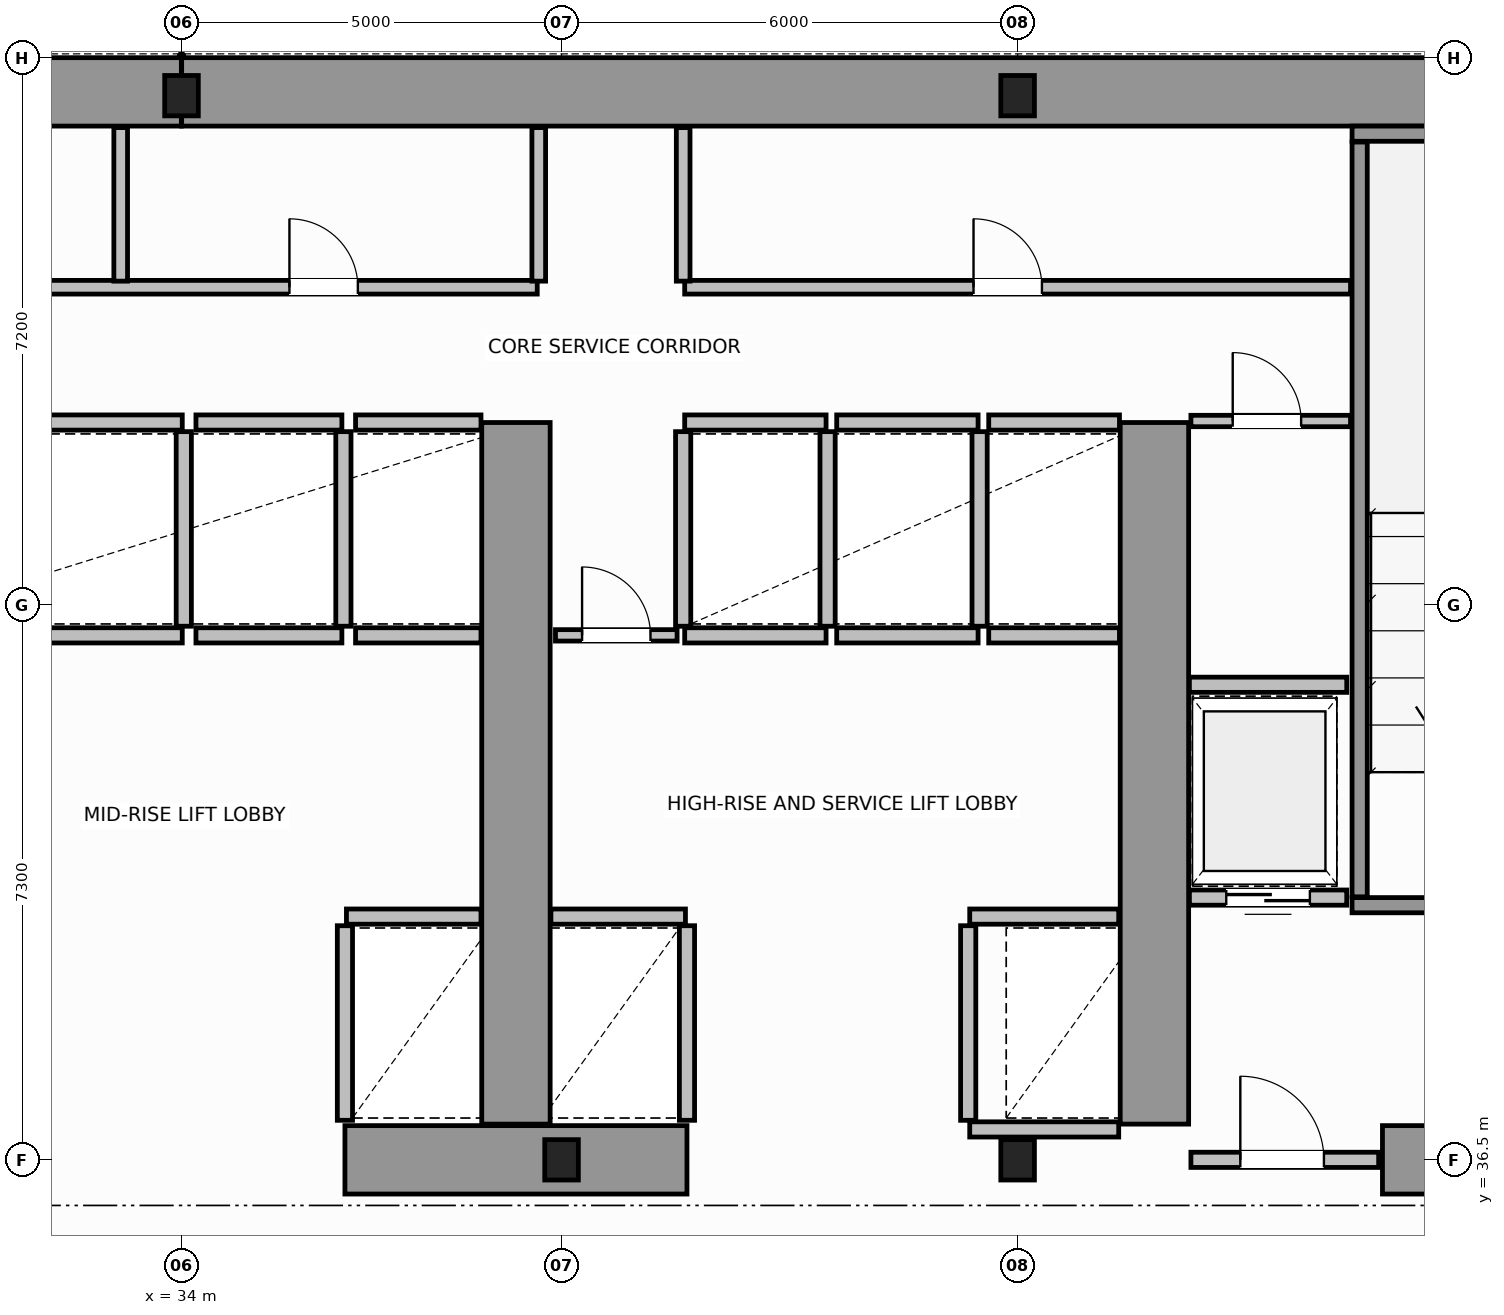
"""IFC4 building model, lengths in metres.
Left out: names, types, materials, properties, quantities, classifications, styles, units other than length and angle.
Written with IfcOpenShell. Run it as: python <this file> out.ifc"""

import sys

from ifc_helpers import new_model, si_unit, direction, frame, frame_2d, origin, origin_2d, place, context, subcontext, project, spatial, rectangle, i_section, extrude, source, transform, mapped, element, fill, save


model = new_model("IFC4")
c1 = context("Model", 3, precision=1e-05, world=origin(), true_north=direction((0.0, 1.0)))
c2 = subcontext(c1, "Body", "Model", "MODEL_VIEW")
j1 = project(units=[si_unit("LENGTHUNIT", "METRE"), si_unit("PLANEANGLEUNIT", "RADIAN")], contexts=[c1])
p1 = place(None, origin())
s1 = spatial("IfcSite", under=j1, at=p1, CompositionType="ELEMENT")
p2 = place(p1, origin())
s2 = spatial("IfcBuilding", under=s1, at=p2, CompositionType="ELEMENT")
p3 = place(p2, frame((0.0, 0.0, 72.0)))
s3 = spatial("IfcBuildingStorey", under=s2, at=p3, CompositionType="ELEMENT", Elevation=72.0)
m1 = source(origin(), c2, "Body", "SweptSolid", [
    extrude(i_section(OverallWidth=0.442, OverallDepth=0.531, WebThickness=0.065, FlangeThickness=0.076, FilletRadius=0.015, at=origin_2d()), origin(), (0.0, 0.0, 1.0), 3.8),
])
for number, where, z_axis, x_axis in (
    (1, (39.0, 36.5, 0.0), (0.0, 0.0, 1.0), (1.0, 0.0, 0.0)),
    (2, (45.0, 36.5, 0.0), (0.0, 0.0, 1.0), (1.0, 0.0, 0.0)),
    (3, (34.0, 50.5, 0.0), (0.0, 0.0, 1.0), (1.0, 0.0, 0.0)),
    (4, (45.0, 50.5, 0.0), (0.0, 0.0, 1.0), (1.0, 0.0, 0.0)),
):
    element("IfcColumn", number, at=place(p3, frame(where, z_axis=z_axis, x_axis=x_axis)), inside=s3, PredefinedType="COLUMN", context=c2, shape_type="MappedRepresentation", body=[
        mapped(m1, transform((0.0, 0.0, 0.0), scale=1.0)),
    ])
for number, where, z_axis, x_axis in (
    (5, (14.454, 50.55, 0.0), (0.0, 0.0, 1.0), (1.0, 0.0, 0.0)),
    (6, (34.002, 50.55, 0.0), (0.0, 0.0, 1.0), (1.0, 0.0, 0.0)),
):
    element("IfcWall", number, at=place(p3, frame(where, z_axis=z_axis, x_axis=x_axis)), inside=s3, PredefinedType="SHEAR", context=c2, shape_type="SweptSolid", body=[
        extrude(rectangle(XDim=19.544, YDim=0.9, at=frame_2d((9.772, 0.0))), origin(), (0.0, 0.0, 1.0), 3.8),
    ])
p4 = place(p3, frame((36.15, 36.5, 0.0), z_axis=(0.0, 0.0, 1.0), x_axis=(1.0, 0.0, 0.0)))
e7 = element("IfcWall", 7, at=p4, inside=s3, PredefinedType="SHEAR", context=c2, shape_type="SweptSolid", body=[
    extrude(rectangle(XDim=4.5, YDim=0.9, at=frame_2d((2.25, 0.0))), origin(), (0.0, 0.0, 1.0), 3.8),
])
p5 = place(p3, frame((49.8, 36.5, 0.0), z_axis=(0.0, 0.0, 1.0), x_axis=(1.0, 0.0, 0.0)))
e8 = element("IfcWall", 8, at=p5, inside=s3, PredefinedType="SHEAR", context=c2, shape_type="SweptSolid", body=[
    extrude(rectangle(XDim=3.73, YDim=0.9, at=frame_2d((1.865, 0.0))), origin(), (0.0, 0.0, 1.0), 2.38),
])
for number, where, z_axis, x_axis in (
    (9, (38.4, 36.97, 0.0), (0.0, 0.0, 1.0), (0.0, 1.0, 0.0)),
    (10, (46.8, 36.97, 0.0), (0.0, 0.0, 1.0), (0.0, 1.0, 0.0)),
):
    element("IfcWall", number, at=place(p3, frame(where, z_axis=z_axis, x_axis=x_axis)), inside=s3, PredefinedType="SHEAR", context=c2, shape_type="SweptSolid", body=[
        extrude(rectangle(XDim=9.23, YDim=0.9, at=frame_2d((4.615, 0.0))), origin(), (0.0, 0.0, 1.0), 3.8),
    ])
p6 = place(p3, frame((49.4, 39.85, 0.0), z_axis=(0.0, 0.0, 1.0), x_axis=(1.0, 0.0, 0.0)))
e11 = element("IfcWall", 11, at=p6, inside=s3, PredefinedType="SOLIDWALL", context=c2, shape_type="SweptSolid", body=[
    extrude(rectangle(XDim=4.15, YDim=0.2, at=frame_2d((2.075, 0.0))), origin(), (0.0, 0.0, 1.0), 3.8),
])
p7 = place(p6, frame((1.325, 0.0, 0.0)))
e12 = element("IfcOpeningElement", 12, at=p7, cuts=e11, PredefinedType="OPENING", context=c2, shape_type="SweptSolid", body=[
    extrude(rectangle(XDim=1.1, YDim=2.15, at=frame_2d((0.55, 1.075))), frame((0.0, 0.11, 0.0), z_axis=(0.0, -1.0, 0.0), x_axis=(1.0, 0.0, 0.0)), (0.0, 0.0, 1.0), 0.22),
])
p8 = place(p3, frame((49.4, 50.0, 0.0), z_axis=(0.0, 0.0, 1.0), x_axis=(1.0, 0.0, 0.0)))
e13 = element("IfcWall", 13, at=p8, inside=s3, PredefinedType="SOLIDWALL", context=c2, shape_type="SweptSolid", body=[
    extrude(rectangle(XDim=4.15, YDim=0.2, at=frame_2d((2.075, 0.0))), origin(), (0.0, 0.0, 1.0), 3.8),
])
p9 = place(p3, frame((49.5, 39.96, 0.0), z_axis=(0.0, 0.0, 1.0), x_axis=(0.0, 1.0, 0.0)))
e14 = element("IfcWall", 14, at=p9, inside=s3, PredefinedType="SOLIDWALL", context=c2, shape_type="SweptSolid", body=[
    extrude(rectangle(XDim=9.93, YDim=0.2, at=frame_2d((4.965, 0.0))), origin(), (0.0, 0.0, 1.0), 3.8),
])
p10 = place(p3, frame((47.28, 36.5, 0.0), z_axis=(0.0, 0.0, 1.0), x_axis=(1.0, 0.0, 0.0)))
e15 = element("IfcWall", 15, at=p10, inside=s3, PredefinedType="SOLIDWALL", context=c2, shape_type="SweptSolid", body=[
    extrude(rectangle(XDim=2.47, YDim=0.2, at=frame_2d((1.235, 0.0))), origin(), (0.0, 0.0, 1.0), 2.37),
])
p11 = place(p10, frame((0.65, 0.0, 0.0)))
e16 = element("IfcOpeningElement", 16, at=p11, cuts=e15, PredefinedType="OPENING", context=c2, shape_type="SweptSolid", body=[
    extrude(rectangle(XDim=1.1, YDim=2.15, at=frame_2d((0.55, 1.075))), frame((0.0, 0.11, 0.0), z_axis=(0.0, -1.0, 0.0), x_axis=(1.0, 0.0, 0.0)), (0.0, 0.0, 1.0), 0.22),
])
p12 = place(p3, frame((36.17, 39.7, 0.0), z_axis=(0.0, 0.0, 1.0), x_axis=(1.0, 0.0, 0.0)))
e17 = element("IfcWall", 17, at=p12, inside=s3, PredefinedType="SOLIDWALL", context=c2, shape_type="SweptSolid", body=[
    extrude(rectangle(XDim=1.77, YDim=0.2, at=frame_2d((0.885, 0.0))), origin(), (0.0, 0.0, 1.0), 3.58),
])
p13 = place(p3, frame((36.15, 37.02, 0.0), z_axis=(0.0, 0.0, 1.0), x_axis=(0.0, 1.0, 0.0)))
e18 = element("IfcWall", 18, at=p13, inside=s3, PredefinedType="SOLIDWALL", context=c2, shape_type="SweptSolid", body=[
    extrude(rectangle(XDim=2.56, YDim=0.2, at=frame_2d((1.28, 0.0))), origin(), (0.0, 0.0, 1.0), 3.58),
])
for number, where, z_axis, x_axis in (
    (19, (32.09, 43.4, 0.0), (0.0, 0.0, 1.0), (1.0, 0.0, 0.0)),
    (20, (32.09, 46.2, 0.0), (0.0, 0.0, 1.0), (1.0, 0.0, 0.0)),
):
    element("IfcWall", number, at=place(p3, frame(where, z_axis=z_axis, x_axis=x_axis)), inside=s3, PredefinedType="SOLIDWALL", context=c2, shape_type="SweptSolid", body=[
        extrude(rectangle(XDim=1.92, YDim=0.2, at=frame_2d((0.96, 0.0))), origin(), (0.0, 0.0, 1.0), 3.58),
    ])
p14 = place(p3, frame((34.03, 43.52, 0.0), z_axis=(0.0, 0.0, 1.0), x_axis=(0.0, 1.0, 0.0)))
e21 = element("IfcWall", 21, at=p14, inside=s3, PredefinedType="SOLIDWALL", context=c2, shape_type="SweptSolid", body=[
    extrude(rectangle(XDim=2.56, YDim=0.2, at=frame_2d((1.28, 0.0))), origin(), (0.0, 0.0, 1.0), 3.58),
])
for number, where, z_axis, x_axis in (
    (22, (34.19, 43.4, 0.0), (0.0, 0.0, 1.0), (1.0, 0.0, 0.0)),
    (23, (34.19, 46.2, 0.0), (0.0, 0.0, 1.0), (1.0, 0.0, 0.0)),
):
    element("IfcWall", number, at=place(p3, frame(where, z_axis=z_axis, x_axis=x_axis)), inside=s3, PredefinedType="SOLIDWALL", context=c2, shape_type="SweptSolid", body=[
        extrude(rectangle(XDim=1.92, YDim=0.2, at=frame_2d((0.96, 0.0))), origin(), (0.0, 0.0, 1.0), 3.58),
    ])
p15 = place(p3, frame((36.13, 43.52, 0.0), z_axis=(0.0, 0.0, 1.0), x_axis=(0.0, 1.0, 0.0)))
e24 = element("IfcWall", 24, at=p15, inside=s3, PredefinedType="SOLIDWALL", context=c2, shape_type="SweptSolid", body=[
    extrude(rectangle(XDim=2.56, YDim=0.2, at=frame_2d((1.28, 0.0))), origin(), (0.0, 0.0, 1.0), 3.58),
])
for number, where, z_axis, x_axis in (
    (25, (36.29, 43.4, 0.0), (0.0, 0.0, 1.0), (1.0, 0.0, 0.0)),
    (26, (36.29, 46.2, 0.0), (0.0, 0.0, 1.0), (1.0, 0.0, 0.0)),
):
    element("IfcWall", number, at=place(p3, frame(where, z_axis=z_axis, x_axis=x_axis)), inside=s3, PredefinedType="SOLIDWALL", context=c2, shape_type="SweptSolid", body=[
        extrude(rectangle(XDim=1.65, YDim=0.2, at=frame_2d((0.825, 0.0))), origin(), (0.0, 0.0, 1.0), 3.58),
    ])
p16 = place(p3, frame((38.86, 39.7, 0.0), z_axis=(0.0, 0.0, 1.0), x_axis=(1.0, 0.0, 0.0)))
e27 = element("IfcWall", 27, at=p16, inside=s3, PredefinedType="SOLIDWALL", context=c2, shape_type="SweptSolid", body=[
    extrude(rectangle(XDim=1.77, YDim=0.2, at=frame_2d((0.885, 0.0))), origin(), (0.0, 0.0, 1.0), 3.58),
])
p17 = place(p3, frame((40.65, 37.02, 0.0), z_axis=(0.0, 0.0, 1.0), x_axis=(0.0, 1.0, 0.0)))
e28 = element("IfcWall", 28, at=p17, inside=s3, PredefinedType="SOLIDWALL", context=c2, shape_type="SweptSolid", body=[
    extrude(rectangle(XDim=2.56, YDim=0.2, at=frame_2d((1.28, 0.0))), origin(), (0.0, 0.0, 1.0), 3.58),
])
p18 = place(p3, frame((44.37, 39.7, 0.0), z_axis=(0.0, 0.0, 1.0), x_axis=(1.0, 0.0, 0.0)))
e29 = element("IfcWall", 29, at=p18, inside=s3, PredefinedType="SOLIDWALL", context=c2, shape_type="SweptSolid", body=[
    extrude(rectangle(XDim=1.96, YDim=0.2, at=frame_2d((0.98, 0.0))), origin(), (0.0, 0.0, 1.0), 3.58),
])
p19 = place(p3, frame((44.37, 36.9, 0.0), z_axis=(0.0, 0.0, 1.0), x_axis=(1.0, 0.0, 0.0)))
e30 = element("IfcWall", 30, at=p19, inside=s3, PredefinedType="SOLIDWALL", context=c2, shape_type="SweptSolid", body=[
    extrude(rectangle(XDim=1.96, YDim=0.2, at=frame_2d((0.98, 0.0))), origin(), (0.0, 0.0, 1.0), 2.37),
])
p20 = place(p3, frame((44.35, 37.02, 0.0), z_axis=(0.0, 0.0, 1.0), x_axis=(0.0, 1.0, 0.0)))
e31 = element("IfcWall", 31, at=p20, inside=s3, PredefinedType="SOLIDWALL", context=c2, shape_type="SweptSolid", body=[
    extrude(rectangle(XDim=2.56, YDim=0.2, at=frame_2d((1.28, 0.0))), origin(), (0.0, 0.0, 1.0), 3.58),
])
for number, where, z_axis, x_axis in (
    (32, (40.62, 43.4, 0.0), (0.0, 0.0, 1.0), (1.0, 0.0, 0.0)),
    (33, (40.62, 46.2, 0.0), (0.0, 0.0, 1.0), (1.0, 0.0, 0.0)),
):
    element("IfcWall", number, at=place(p3, frame(where, z_axis=z_axis, x_axis=x_axis)), inside=s3, PredefinedType="SOLIDWALL", context=c2, shape_type="SweptSolid", body=[
        extrude(rectangle(XDim=1.86, YDim=0.2, at=frame_2d((0.93, 0.0))), origin(), (0.0, 0.0, 1.0), 3.58),
    ])
for number, where, z_axis, x_axis in (
    (34, (40.6, 43.52, 0.0), (0.0, 0.0, 1.0), (0.0, 1.0, 0.0)),
    (35, (42.5, 43.52, 0.0), (0.0, 0.0, 1.0), (0.0, 1.0, 0.0)),
):
    element("IfcWall", number, at=place(p3, frame(where, z_axis=z_axis, x_axis=x_axis)), inside=s3, PredefinedType="SOLIDWALL", context=c2, shape_type="SweptSolid", body=[
        extrude(rectangle(XDim=2.56, YDim=0.2, at=frame_2d((1.28, 0.0))), origin(), (0.0, 0.0, 1.0), 3.58),
    ])
for number, where, z_axis, x_axis in (
    (36, (42.62, 43.4, 0.0), (0.0, 0.0, 1.0), (1.0, 0.0, 0.0)),
    (37, (42.62, 46.2, 0.0), (0.0, 0.0, 1.0), (1.0, 0.0, 0.0)),
):
    element("IfcWall", number, at=place(p3, frame(where, z_axis=z_axis, x_axis=x_axis)), inside=s3, PredefinedType="SOLIDWALL", context=c2, shape_type="SweptSolid", body=[
        extrude(rectangle(XDim=1.86, YDim=0.2, at=frame_2d((0.93, 0.0))), origin(), (0.0, 0.0, 1.0), 3.58),
    ])
p21 = place(p3, frame((44.5, 43.52, 0.0), z_axis=(0.0, 0.0, 1.0), x_axis=(0.0, 1.0, 0.0)))
e38 = element("IfcWall", 38, at=p21, inside=s3, PredefinedType="SOLIDWALL", context=c2, shape_type="SweptSolid", body=[
    extrude(rectangle(XDim=2.56, YDim=0.2, at=frame_2d((1.28, 0.0))), origin(), (0.0, 0.0, 1.0), 3.58),
])
for number, where, z_axis, x_axis in (
    (39, (44.62, 43.4, 0.0), (0.0, 0.0, 1.0), (1.0, 0.0, 0.0)),
    (40, (44.62, 46.2, 0.0), (0.0, 0.0, 1.0), (1.0, 0.0, 0.0)),
):
    element("IfcWall", number, at=place(p3, frame(where, z_axis=z_axis, x_axis=x_axis)), inside=s3, PredefinedType="SOLIDWALL", context=c2, shape_type="SweptSolid", body=[
        extrude(rectangle(XDim=1.72, YDim=0.2, at=frame_2d((0.86, 0.0))), origin(), (0.0, 0.0, 1.0), 3.58),
    ])
p22 = place(p3, frame((47.26, 39.95, 0.0), z_axis=(0.0, 0.0, 1.0), x_axis=(1.0, 0.0, 0.0)))
e41 = element("IfcWall", 41, at=p22, inside=s3, PredefinedType="SOLIDWALL", context=c2, shape_type="SweptSolid", body=[
    extrude(rectangle(XDim=2.07, YDim=0.2, at=frame_2d((1.035, 0.0))), origin(), (0.0, 0.0, 1.0), 3.58),
])
p23 = place(p22, frame((0.485, 0.0, 0.0)))
e42 = element("IfcOpeningElement", 42, at=p23, cuts=e41, PredefinedType="OPENING", context=c2, shape_type="SweptSolid", body=[
    extrude(rectangle(XDim=1.1, YDim=2.15, at=frame_2d((0.55, 1.075))), frame((0.0, 0.11, 0.0), z_axis=(0.0, -1.0, 0.0), x_axis=(1.0, 0.0, 0.0)), (0.0, 0.0, 1.0), 0.22),
])
p24 = place(p3, frame((47.26, 42.75, 0.0), z_axis=(0.0, 0.0, 1.0), x_axis=(1.0, 0.0, 0.0)))
e43 = element("IfcWall", 43, at=p24, inside=s3, PredefinedType="SOLIDWALL", context=c2, shape_type="SweptSolid", body=[
    extrude(rectangle(XDim=2.07, YDim=0.2, at=frame_2d((1.035, 0.0))), origin(), (0.0, 0.0, 1.0), 3.58),
])
p25 = place(p3, frame((47.28, 46.22, 0.0), z_axis=(0.0, 0.0, 1.0), x_axis=(1.0, 0.0, 0.0)))
e44 = element("IfcWall", 44, at=p25, inside=s3, PredefinedType="PARTITIONING", context=c2, shape_type="SweptSolid", body=[
    extrude(rectangle(XDim=2.1, YDim=0.15, at=frame_2d((1.05, 0.0))), origin(), (0.0, 0.0, 1.0), 3.58),
])
p26 = place(p25, frame((0.55, 0.0, 0.0)))
e45 = element("IfcOpeningElement", 45, at=p26, cuts=e44, PredefinedType="OPENING", context=c2, shape_type="SweptSolid", body=[
    extrude(rectangle(XDim=0.9, YDim=2.1, at=frame_2d((0.45, 1.05))), frame((0.0, 0.085, 0.0), z_axis=(0.0, -1.0, 0.0), x_axis=(1.0, 0.0, 0.0)), (0.0, 0.0, 1.0), 0.17),
])
p27 = place(p3, frame((38.92, 43.4, 0.0), z_axis=(0.0, 0.0, 1.0), x_axis=(1.0, 0.0, 0.0)))
e46 = element("IfcWall", 46, at=p27, inside=s3, PredefinedType="PARTITIONING", context=c2, shape_type="SweptSolid", body=[
    extrude(rectangle(XDim=1.6, YDim=0.15, at=frame_2d((0.8, 0.0))), origin(), (0.0, 0.0, 1.0), 3.58),
])
p28 = place(p27, frame((0.35, 0.0, 0.0)))
e47 = element("IfcOpeningElement", 47, at=p28, cuts=e46, PredefinedType="OPENING", context=c2, shape_type="SweptSolid", body=[
    extrude(rectangle(XDim=0.9, YDim=2.1, at=frame_2d((0.45, 1.05))), frame((0.0, 0.085, 0.0), z_axis=(0.0, -1.0, 0.0), x_axis=(1.0, 0.0, 0.0)), (0.0, 0.0, 1.0), 0.17),
])
p29 = place(p3, frame((18.62, 47.98, 0.0), z_axis=(0.0, 0.0, 1.0), x_axis=(1.0, 0.0, 0.0)))
e48 = element("IfcWall", 48, at=p29, inside=s3, PredefinedType="PLUMBINGWALL", context=c2, shape_type="SweptSolid", body=[
    extrude(rectangle(XDim=20.06, YDim=0.18, at=frame_2d((10.03, 0.0))), origin(), (0.0, 0.0, 1.0), 3.58),
])
p30 = place(p29, frame((3.5, 0.0, 0.0)))
e49 = element("IfcOpeningElement", 49, at=p30, cuts=e48, PredefinedType="OPENING", context=c2, shape_type="SweptSolid", body=[
    extrude(rectangle(XDim=0.9, YDim=2.15, at=frame_2d((0.45, 1.075))), frame((0.0, 0.1, 0.0), z_axis=(0.0, -1.0, 0.0), x_axis=(1.0, 0.0, 0.0)), (0.0, 0.0, 1.0), 0.2),
])
p31 = place(p29, frame((10.8, 0.0, 0.0)))
e50 = element("IfcOpeningElement", 50, at=p31, cuts=e48, PredefinedType="OPENING", context=c2, shape_type="SweptSolid", body=[
    extrude(rectangle(XDim=0.9, YDim=2.15, at=frame_2d((0.45, 1.075))), frame((0.0, 0.1, 0.0), z_axis=(0.0, -1.0, 0.0), x_axis=(1.0, 0.0, 0.0)), (0.0, 0.0, 1.0), 0.2),
])
p32 = place(p29, frame((16.8, 0.0, 0.0)))
e51 = element("IfcOpeningElement", 51, at=p32, cuts=e48, PredefinedType="OPENING", context=c2, shape_type="SweptSolid", body=[
    extrude(rectangle(XDim=0.9, YDim=2.15, at=frame_2d((0.45, 1.075))), frame((0.0, 0.1, 0.0), z_axis=(0.0, -1.0, 0.0), x_axis=(1.0, 0.0, 0.0)), (0.0, 0.0, 1.0), 0.2),
])
p33 = place(p3, frame((40.62, 47.98, 0.0), z_axis=(0.0, 0.0, 1.0), x_axis=(1.0, 0.0, 0.0)))
e52 = element("IfcWall", 52, at=p33, inside=s3, PredefinedType="PLUMBINGWALL", context=c2, shape_type="SweptSolid", body=[
    extrude(rectangle(XDim=8.76, YDim=0.18, at=frame_2d((4.38, 0.0))), origin(), (0.0, 0.0, 1.0), 3.58),
])
p34 = place(p33, frame((3.8, 0.0, 0.0)))
e53 = element("IfcOpeningElement", 53, at=p34, cuts=e52, PredefinedType="OPENING", context=c2, shape_type="SweptSolid", body=[
    extrude(rectangle(XDim=0.9, YDim=2.15, at=frame_2d((0.45, 1.075))), frame((0.0, 0.1, 0.0), z_axis=(0.0, -1.0, 0.0), x_axis=(1.0, 0.0, 0.0)), (0.0, 0.0, 1.0), 0.2),
])
for number, where, z_axis, x_axis in (
    (54, (33.2, 48.06, 0.0), (0.0, 0.0, 1.0), (0.0, 1.0, 0.0)),
    (55, (38.7, 48.06, 0.0), (0.0, 0.0, 1.0), (0.0, 1.0, 0.0)),
    (56, (40.6, 48.06, 0.0), (0.0, 0.0, 1.0), (0.0, 1.0, 0.0)),
):
    element("IfcWall", number, at=place(p3, frame(where, z_axis=z_axis, x_axis=x_axis)), inside=s3, PredefinedType="PLUMBINGWALL", context=c2, shape_type="SweptSolid", body=[
        extrude(rectangle(XDim=2.02, YDim=0.18, at=frame_2d((1.01, 0.0))), origin(), (0.0, 0.0, 1.0), 3.58),
    ])
m2 = source(origin(), c2, "Body", "SweptSolid", [
    extrude(rectangle(XDim=1.1, YDim=2.15, at=frame_2d((0.55, 1.075))), frame((0.0, 0.025, 0.0), z_axis=(0.0, -1.0, 0.0), x_axis=(1.0, 0.0, 0.0)), (0.0, 0.0, 1.0), 0.05),
])
p35 = place(p11, origin())
e57 = element("IfcDoor", 57, at=p35, inside=s3, OperationType="SINGLE_SWING_LEFT", PredefinedType="DOOR", context=c2, shape_type="MappedRepresentation", body=[
    mapped(m2, transform((0.0, 0.0, 0.0), scale=1.0)),
])
fill(e16, e57)
p36 = place(p23, origin())
e58 = element("IfcDoor", 58, at=p36, inside=s3, OperationType="DOUBLE_DOOR_SLIDING", PredefinedType="DOOR", context=c2, shape_type="MappedRepresentation", body=[
    mapped(m2, transform((0.0, 0.0, 0.0), scale=1.0)),
])
fill(e42, e58)
m3 = source(origin(), c2, "Body", "SweptSolid", [
    extrude(rectangle(XDim=0.9, YDim=2.1, at=frame_2d((0.45, 1.05))), frame((0.0, 0.025, 0.0), z_axis=(0.0, -1.0, 0.0), x_axis=(1.0, 0.0, 0.0)), (0.0, 0.0, 1.0), 0.05),
])
p37 = place(p26, origin())
e59 = element("IfcDoor", 59, at=p37, inside=s3, OperationType="SINGLE_SWING_RIGHT", PredefinedType="DOOR", context=c2, shape_type="MappedRepresentation", body=[
    mapped(m3, transform((0.0, 0.0, 0.0), scale=1.0)),
])
fill(e45, e59)
p38 = place(p28, origin())
e60 = element("IfcDoor", 60, at=p38, inside=s3, OperationType="SINGLE_SWING_LEFT", PredefinedType="DOOR", context=c2, shape_type="MappedRepresentation", body=[
    mapped(m3, transform((0.0, 0.0, 0.0), scale=1.0)),
])
fill(e47, e60)
m4 = source(origin(), c2, "Body", "SweptSolid", [
    extrude(rectangle(XDim=0.9, YDim=2.15, at=frame_2d((0.45, 1.075))), frame((0.0, 0.025, 0.0), z_axis=(0.0, -1.0, 0.0), x_axis=(1.0, 0.0, 0.0)), (0.0, 0.0, 1.0), 0.05),
])
p39 = place(p32, origin())
e61 = element("IfcDoor", 61, at=p39, inside=s3, OperationType="SINGLE_SWING_LEFT", PredefinedType="DOOR", context=c2, shape_type="MappedRepresentation", body=[
    mapped(m4, transform((0.0, 0.0, 0.0), scale=1.0)),
])
fill(e51, e61)
p40 = place(p34, origin())
e62 = element("IfcDoor", 62, at=p40, inside=s3, OperationType="SINGLE_SWING_RIGHT", PredefinedType="DOOR", context=c2, shape_type="MappedRepresentation", body=[
    mapped(m4, transform((0.0, 0.0, 0.0), scale=1.0)),
])
fill(e53, e62)
save(model, sys.argv[1])
